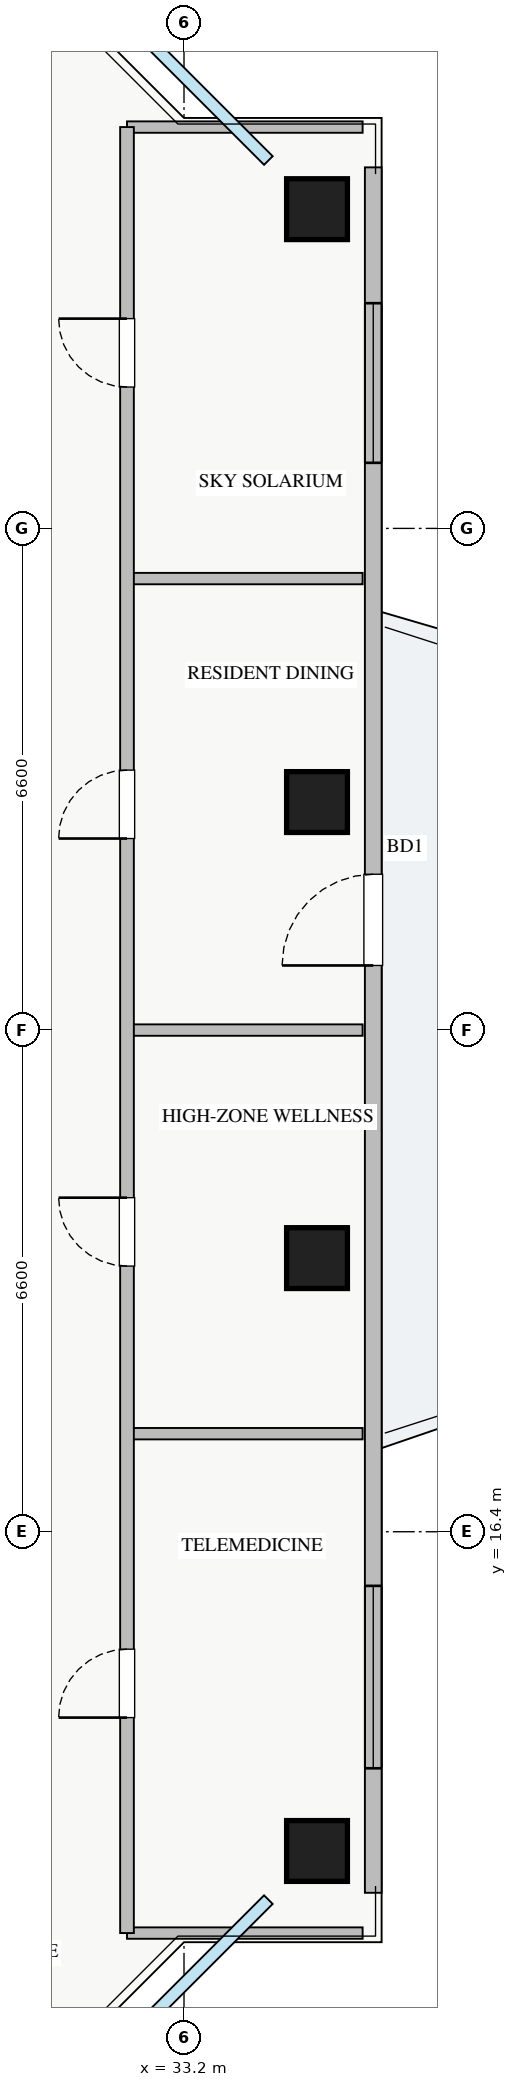
"""IFC4 building model, lengths in metres.
Left out: names, types, materials, properties, quantities, classifications, styles, units other than length and angle.
Written with IfcOpenShell. Run it as: python <this file> out.ifc"""

import sys

from ifc_helpers import new_model, si_unit, direction, frame, frame_2d, origin, origin_2d, place, context, subcontext, project, spatial, rectangle, extrude, source, transform, mapped, element, fill, save


model = new_model("IFC4")
c1 = context("Model", 3, precision=1e-05, world=origin(), true_north=direction((0.0, 1.0)))
c2 = subcontext(c1, "Body", "Model", "MODEL_VIEW")
j1 = project(units=[si_unit("LENGTHUNIT", "METRE"), si_unit("PLANEANGLEUNIT", "RADIAN")], contexts=[c1])
p1 = place(None, origin())
s1 = spatial("IfcSite", under=j1, at=p1, CompositionType="ELEMENT")
p2 = place(p1, origin())
s2 = spatial("IfcBuilding", under=s1, at=p2, CompositionType="ELEMENT")
p3 = place(p2, frame((0.0, 0.0, 210.0)))
s3 = spatial("IfcBuildingStorey", under=s2, at=p3, CompositionType="ELEMENT", Elevation=210.0)
m1 = source(origin(), c2, "Body", "SweptSolid", [
    extrude(rectangle(XDim=0.8, YDim=0.8, at=origin_2d()), origin(), (0.0, 0.0, 1.0), 3.25),
])
for number, where, z_axis, x_axis in (
    (1, (34.95, 12.2, 0.0), (0.0, 0.0, 1.0), (1.0, 0.0, 0.0)),
    (2, (34.95, 20.0, 0.0), (0.0, 0.0, 1.0), (1.0, 0.0, 0.0)),
    (3, (34.95, 26.0, 0.0), (0.0, 0.0, 1.0), (1.0, 0.0, 0.0)),
    (4, (34.95, 33.8, 0.0), (0.0, 0.0, 1.0), (1.0, 0.0, 0.0)),
):
    element("IfcColumn", number, at=place(p3, frame(where, z_axis=z_axis, x_axis=x_axis)), inside=s3, PredefinedType="COLUMN", context=c2, shape_type="MappedRepresentation", body=[
        mapped(m1, transform((0.0, 0.0, 0.0), x_axis=(1.0, 0.0, 0.0), y_axis=(0.0, 1.0, 0.0), z_axis=(0.0, 0.0, 1.0), scale=1.0)),
    ])
p4 = place(p3, frame((35.69, 11.65, 0.0), z_axis=(0.0, 0.0, 1.0), x_axis=(0.0, 1.0, 0.0)))
e5 = element("IfcWall", 5, at=p4, inside=s3, PredefinedType="STANDARD", context=c2, shape_type="SweptSolid", body=[
    extrude(rectangle(XDim=22.7, YDim=0.22, at=frame_2d((11.35, 0.0))), origin(), (0.0, 0.0, 1.0), 2.61),
])
p5 = place(p4, frame((12.2, 0.0, 0.0)))
e6 = element("IfcOpeningElement", 6, at=p5, cuts=e5, PredefinedType="OPENING", context=c2, shape_type="SweptSolid", body=[
    extrude(rectangle(XDim=1.2, YDim=2.1, at=frame_2d((0.6, 1.05))), frame((0.0, 0.12, 0.0), z_axis=(0.0, -1.0, 0.0), x_axis=(1.0, 0.0, 0.0)), (0.0, 0.0, 1.0), 0.24),
])
p6 = place(p4, frame((1.638, 0.0, 0.9)))
e7 = element("IfcOpeningElement", 7, at=p6, cuts=e5, PredefinedType="OPENING", context=c2, shape_type="SweptSolid", body=[
    extrude(rectangle(XDim=2.4, YDim=1.48, at=frame_2d((1.2, 0.74))), frame((0.0, 0.12, 0.0), z_axis=(0.0, -1.0, 0.0), x_axis=(1.0, 0.0, 0.0)), (0.0, 0.0, 1.0), 0.24),
])
p7 = place(p4, frame((18.813, 0.0, 0.9)))
e8 = element("IfcOpeningElement", 8, at=p7, cuts=e5, PredefinedType="OPENING", context=c2, shape_type="SweptSolid", body=[
    extrude(rectangle(XDim=2.1, YDim=1.48, at=frame_2d((1.05, 0.74))), frame((0.0, 0.12, 0.0), z_axis=(0.0, -1.0, 0.0), x_axis=(1.0, 0.0, 0.0)), (0.0, 0.0, 1.0), 0.24),
])
for number, where, z_axis, x_axis in (
    (9, (32.45, 34.88, 0.0), (0.0, 0.0, 1.0), (1.0, 0.0, 0.0)),
    (10, (32.45, 11.12, 0.0), (0.0, 0.0, 1.0), (1.0, 0.0, 0.0)),
    (11, (32.45, 17.69, 0.0), (0.0, 0.0, 1.0), (1.0, 0.0, 0.0)),
    (12, (32.45, 23.0, 0.0), (0.0, 0.0, 1.0), (1.0, 0.0, 0.0)),
    (13, (32.45, 28.94, 0.0), (0.0, 0.0, 1.0), (1.0, 0.0, 0.0)),
):
    element("IfcWall", number, at=place(p3, frame(where, z_axis=z_axis, x_axis=x_axis)), inside=s3, PredefinedType="PARTITIONING", context=c2, shape_type="SweptSolid", body=[
        extrude(rectangle(XDim=3.1, YDim=0.15, at=frame_2d((1.55, 0.0))), origin(), (0.0, 0.0, 1.0), 3.07),
    ])
p8 = place(p3, frame((32.45, 11.12, 0.0), z_axis=(0.0, 0.0, 1.0), x_axis=(0.0, 1.0, 0.0)))
e14 = element("IfcWall", 14, at=p8, inside=s3, PredefinedType="PARTITIONING", context=c2, shape_type="SweptSolid", body=[
    extrude(rectangle(XDim=23.76, YDim=0.18, at=frame_2d((11.88, 0.0))), origin(), (0.0, 0.0, 1.0), 3.07),
])
p9 = place(p8, frame((2.835, 0.0, 0.0)))
e15 = element("IfcOpeningElement", 15, at=p9, cuts=e14, PredefinedType="OPENING", context=c2, shape_type="SweptSolid", body=[
    extrude(rectangle(XDim=0.9, YDim=2.05, at=frame_2d((0.45, 1.025))), frame((0.0, 0.1, 0.0), z_axis=(0.0, -1.0, 0.0), x_axis=(1.0, 0.0, 0.0)), (0.0, 0.0, 1.0), 0.2),
])
p10 = place(p8, frame((8.775, 0.0, 0.0)))
e16 = element("IfcOpeningElement", 16, at=p10, cuts=e14, PredefinedType="OPENING", context=c2, shape_type="SweptSolid", body=[
    extrude(rectangle(XDim=0.9, YDim=2.05, at=frame_2d((0.45, 1.025))), frame((0.0, 0.1, 0.0), z_axis=(0.0, -1.0, 0.0), x_axis=(1.0, 0.0, 0.0)), (0.0, 0.0, 1.0), 0.2),
])
p11 = place(p8, frame((14.4, 0.0, 0.0)))
e17 = element("IfcOpeningElement", 17, at=p11, cuts=e14, PredefinedType="OPENING", context=c2, shape_type="SweptSolid", body=[
    extrude(rectangle(XDim=0.9, YDim=2.05, at=frame_2d((0.45, 1.025))), frame((0.0, 0.1, 0.0), z_axis=(0.0, -1.0, 0.0), x_axis=(1.0, 0.0, 0.0)), (0.0, 0.0, 1.0), 0.2),
])
p12 = place(p8, frame((20.34, 0.0, 0.0)))
e18 = element("IfcOpeningElement", 18, at=p12, cuts=e14, PredefinedType="OPENING", context=c2, shape_type="SweptSolid", body=[
    extrude(rectangle(XDim=0.9, YDim=2.05, at=frame_2d((0.45, 1.025))), frame((0.0, 0.1, 0.0), z_axis=(0.0, -1.0, 0.0), x_axis=(1.0, 0.0, 0.0)), (0.0, 0.0, 1.0), 0.2),
])
m2 = source(origin(), c2, "Body", "SweptSolid", [
    extrude(rectangle(XDim=1.2, YDim=2.1, at=frame_2d((0.6, 1.05))), frame((0.0, 0.025, 0.0), z_axis=(0.0, -1.0, 0.0), x_axis=(1.0, 0.0, 0.0)), (0.0, 0.0, 1.0), 0.05),
])
p13 = place(p5, origin())
e19 = element("IfcDoor", 19, at=p13, inside=s3, OperationType="SINGLE_SWING_LEFT", PredefinedType="DOOR", context=c2, shape_type="MappedRepresentation", body=[
    mapped(m2, transform((0.0, 0.0, 0.0), x_axis=(1.0, 0.0, 0.0), y_axis=(0.0, 1.0, 0.0), z_axis=(0.0, 0.0, 1.0), scale=1.0)),
])
fill(e6, e19)
m3 = source(origin(), c2, "Body", "SweptSolid", [
    extrude(rectangle(XDim=2.4, YDim=1.48, at=frame_2d((1.2, 0.74))), frame((0.0, 0.03, 0.0), z_axis=(0.0, -1.0, 0.0), x_axis=(1.0, 0.0, 0.0)), (0.0, 0.0, 1.0), 0.06),
])
p14 = place(p6, origin())
e20 = element("IfcWindow", 20, at=p14, inside=s3, PartitioningType="TRIPLE_PANEL_VERTICAL", PredefinedType="WINDOW", context=c2, shape_type="MappedRepresentation", body=[
    mapped(m3, transform((0.0, 0.0, 0.0), x_axis=(1.0, 0.0, 0.0), y_axis=(0.0, 1.0, 0.0), z_axis=(0.0, 0.0, 1.0), scale=1.0)),
])
fill(e7, e20)
m4 = source(origin(), c2, "Body", "SweptSolid", [
    extrude(rectangle(XDim=2.1, YDim=1.48, at=frame_2d((1.05, 0.74))), frame((0.0, 0.03, 0.0), z_axis=(0.0, -1.0, 0.0), x_axis=(1.0, 0.0, 0.0)), (0.0, 0.0, 1.0), 0.06),
])
p15 = place(p7, origin())
e21 = element("IfcWindow", 21, at=p15, inside=s3, PartitioningType="TRIPLE_PANEL_VERTICAL", PredefinedType="WINDOW", context=c2, shape_type="MappedRepresentation", body=[
    mapped(m4, transform((0.0, 0.0, 0.0), x_axis=(1.0, 0.0, 0.0), y_axis=(0.0, 1.0, 0.0), z_axis=(0.0, 0.0, 1.0), scale=1.0)),
])
fill(e8, e21)
m5 = source(origin(), c2, "Body", "SweptSolid", [
    extrude(rectangle(XDim=0.9, YDim=2.05, at=frame_2d((0.45, 1.025))), frame((0.0, 0.025, 0.0), z_axis=(0.0, -1.0, 0.0), x_axis=(1.0, 0.0, 0.0)), (0.0, 0.0, 1.0), 0.05),
])
p16 = place(p9, origin())
e22 = element("IfcDoor", 22, at=p16, inside=s3, OperationType="SINGLE_SWING_LEFT", PredefinedType="DOOR", context=c2, shape_type="MappedRepresentation", body=[
    mapped(m5, transform((0.0, 0.0, 0.0), x_axis=(1.0, 0.0, 0.0), y_axis=(0.0, 1.0, 0.0), z_axis=(0.0, 0.0, 1.0), scale=1.0)),
])
fill(e15, e22)
p17 = place(p10, origin())
e23 = element("IfcDoor", 23, at=p17, inside=s3, OperationType="SINGLE_SWING_RIGHT", PredefinedType="DOOR", context=c2, shape_type="MappedRepresentation", body=[
    mapped(m5, transform((0.0, 0.0, 0.0), x_axis=(1.0, 0.0, 0.0), y_axis=(0.0, 1.0, 0.0), z_axis=(0.0, 0.0, 1.0), scale=1.0)),
])
fill(e16, e23)
p18 = place(p11, origin())
e24 = element("IfcDoor", 24, at=p18, inside=s3, OperationType="SINGLE_SWING_LEFT", PredefinedType="DOOR", context=c2, shape_type="MappedRepresentation", body=[
    mapped(m5, transform((0.0, 0.0, 0.0), x_axis=(1.0, 0.0, 0.0), y_axis=(0.0, 1.0, 0.0), z_axis=(0.0, 0.0, 1.0), scale=1.0)),
])
fill(e17, e24)
p19 = place(p12, origin())
e25 = element("IfcDoor", 25, at=p19, inside=s3, OperationType="SINGLE_SWING_RIGHT", PredefinedType="DOOR", context=c2, shape_type="MappedRepresentation", body=[
    mapped(m5, transform((0.0, 0.0, 0.0), x_axis=(1.0, 0.0, 0.0), y_axis=(0.0, 1.0, 0.0), z_axis=(0.0, 0.0, 1.0), scale=1.0)),
])
fill(e18, e25)
save(model, sys.argv[1])
